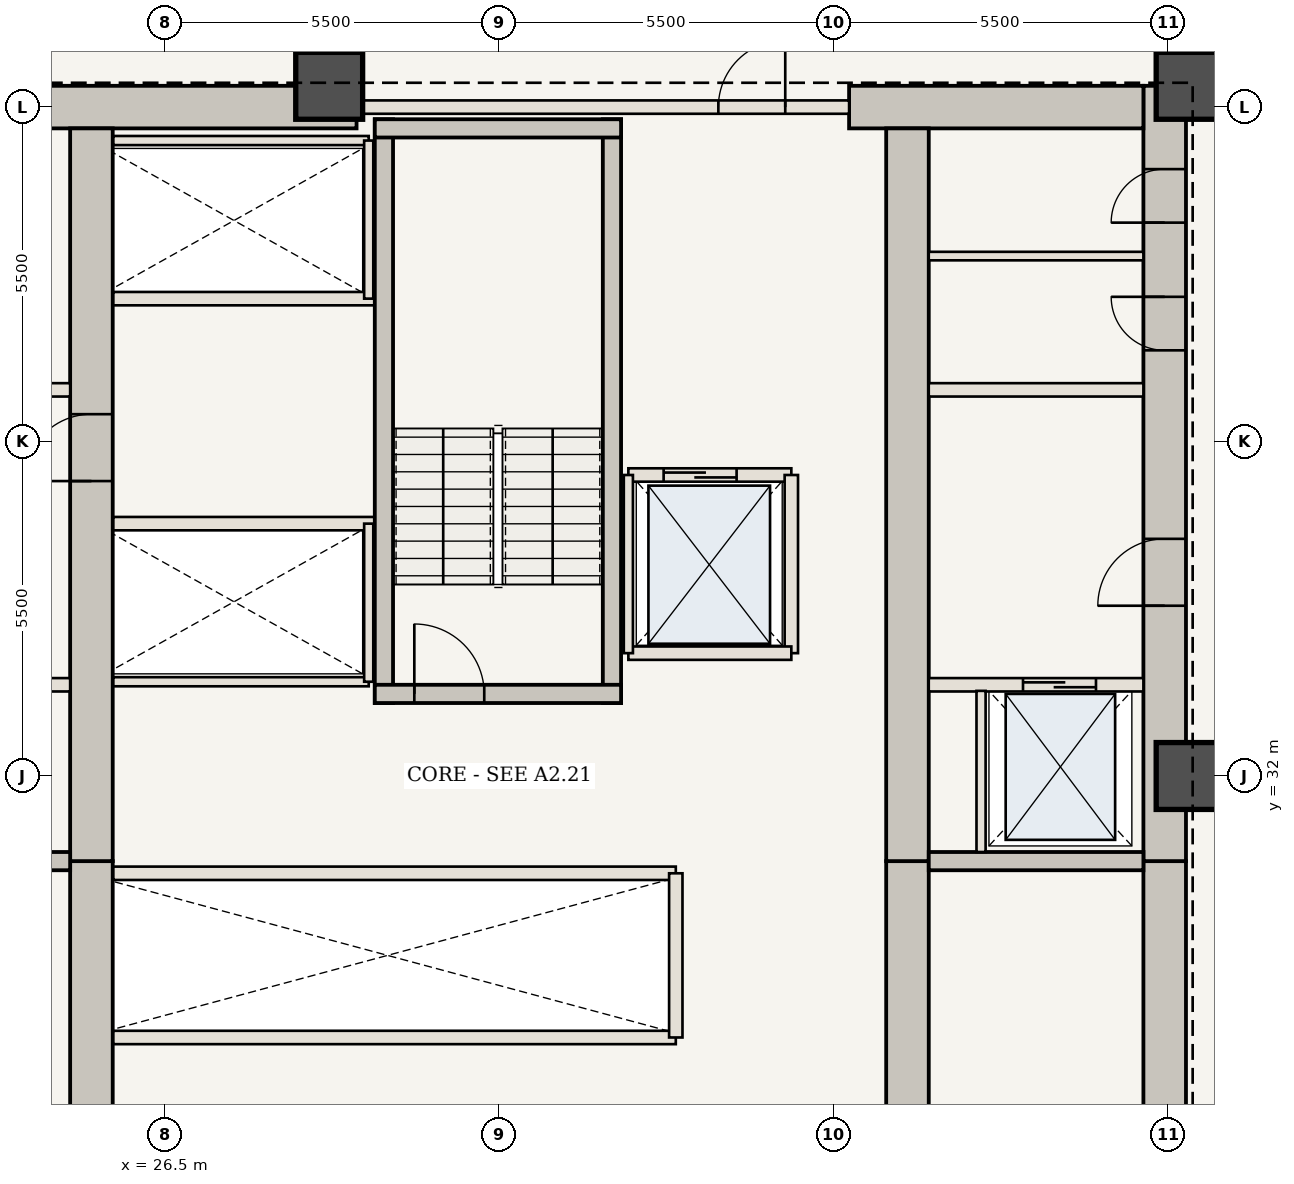
"""IFC4 building model, lengths in metres.
Left out: names, types, materials, properties, quantities, classifications, styles, units other than length and angle.
Written with IfcOpenShell. Run it as: python <this file> out.ifc"""

import sys

from ifc_helpers import new_model, si_unit, direction, frame, frame_2d, origin, origin_2d, place, context, subcontext, project, spatial, rectangle, extrude, element, fill, save


model = new_model("IFC4")
c1 = context("Model", 3, precision=1e-05, world=origin(), true_north=direction((0.0, 1.0)))
c2 = subcontext(c1, "Body", "Model", "MODEL_VIEW")
j1 = project(units=[si_unit("LENGTHUNIT", "METRE"), si_unit("PLANEANGLEUNIT", "RADIAN")], contexts=[c1])
p1 = place(None, origin())
s1 = spatial("IfcSite", under=j1, at=p1, CompositionType="ELEMENT")
p2 = place(p1, origin())
s2 = spatial("IfcBuilding", under=s1, at=p2, CompositionType="ELEMENT")
p3 = place(p2, frame((0.0, 0.0, 85.75)))
s3 = spatial("IfcBuildingStorey", under=s2, at=p3, CompositionType="ELEMENT", Elevation=85.75)
p4 = place(p3, frame((42.94, 20.6, 0.0), z_axis=(0.0, 0.0, 1.0), x_axis=(0.0, 1.0, 0.0)))
e1 = element("IfcWall", 1, at=p4, inside=s3, PredefinedType="SHEAR", context=c2, shape_type="SweptSolid", body=[
    extrude(rectangle(XDim=10.0, YDim=0.7, at=frame_2d((5.0, 0.0))), origin(), (0.0, 0.0, 1.0), 3.5),
])
p5 = place(p4, frame((1.15, 0.0, 0.0)))
e2 = element("IfcOpeningElement", 2, at=p5, cuts=e1, PredefinedType="OPENING", context=c2, shape_type="SweptSolid", body=[
    extrude(rectangle(XDim=1.15, YDim=2.15, at=frame_2d((0.575, 1.075))), frame((0.0, 0.36, 0.0), z_axis=(0.0, -1.0, 0.0), x_axis=(1.0, 0.0, 0.0)), (0.0, 0.0, 1.0), 0.72),
])
p6 = place(p3, frame((42.94, 30.6, 0.0), z_axis=(0.0, 0.0, 1.0), x_axis=(0.0, 1.0, 0.0)))
e3 = element("IfcWall", 3, at=p6, inside=s3, PredefinedType="SHEAR", context=c2, shape_type="SweptSolid", body=[
    extrude(rectangle(XDim=12.75, YDim=0.7, at=frame_2d((6.375, 0.0))), origin(), (0.0, 0.0, 1.0), 3.5),
])
p7 = place(p6, frame((4.2, 0.0, 0.0)))
e4 = element("IfcOpeningElement", 4, at=p7, cuts=e3, PredefinedType="OPENING", context=c2, shape_type="SweptSolid", body=[
    extrude(rectangle(XDim=1.1, YDim=2.15, at=frame_2d((0.55, 1.075))), frame((0.0, 0.36, 0.0), z_axis=(0.0, -1.0, 0.0), x_axis=(1.0, 0.0, 0.0)), (0.0, 0.0, 1.0), 0.72),
])
p8 = place(p6, frame((8.4, 0.0, 0.0)))
e5 = element("IfcOpeningElement", 5, at=p8, cuts=e3, PredefinedType="OPENING", context=c2, shape_type="SweptSolid", body=[
    extrude(rectangle(XDim=0.88, YDim=2.1, at=frame_2d((0.44, 1.05))), frame((0.0, 0.36, 0.0), z_axis=(0.0, -1.0, 0.0), x_axis=(1.0, 0.0, 0.0)), (0.0, 0.0, 1.0), 0.72),
])
p9 = place(p6, frame((10.5, 0.0, 0.0)))
e6 = element("IfcOpeningElement", 6, at=p9, cuts=e3, PredefinedType="OPENING", context=c2, shape_type="SweptSolid", body=[
    extrude(rectangle(XDim=0.88, YDim=2.1, at=frame_2d((0.44, 1.05))), frame((0.0, 0.36, 0.0), z_axis=(0.0, -1.0, 0.0), x_axis=(1.0, 0.0, 0.0)), (0.0, 0.0, 1.0), 0.72),
])
p10 = place(p3, frame((21.41, 43.0, 0.0), z_axis=(0.0, 0.0, 1.0), x_axis=(1.0, 0.0, 0.0)))
e7 = element("IfcWall", 7, at=p10, inside=s3, PredefinedType="SHEAR", context=c2, shape_type="SweptSolid", body=[
    extrude(rectangle(XDim=8.24, YDim=0.7, at=frame_2d((4.12, 0.0))), origin(), (0.0, 0.0, 1.0), 3.5),
])
p11 = place(p3, frame((37.75, 43.0, 0.0), z_axis=(0.0, 0.0, 1.0), x_axis=(1.0, 0.0, 0.0)))
e8 = element("IfcWall", 8, at=p11, inside=s3, PredefinedType="SHEAR", context=c2, shape_type="SweptSolid", body=[
    extrude(rectangle(XDim=4.84, YDim=0.7, at=frame_2d((2.42, 0.0))), origin(), (0.0, 0.0, 1.0), 3.5),
])
p12 = place(p3, frame((25.29, 21.3, 0.0), z_axis=(0.0, 0.0, 1.0), x_axis=(0.0, 1.0, 0.0)))
e9 = element("IfcWall", 9, at=p12, inside=s3, PredefinedType="SHEAR", context=c2, shape_type="SweptSolid", body=[
    extrude(rectangle(XDim=9.3, YDim=0.7, at=frame_2d((4.65, 0.0))), origin(), (0.0, 0.0, 1.0), 3.5),
])
p13 = place(p3, frame((25.29, 30.6, 0.0), z_axis=(0.0, 0.0, 1.0), x_axis=(0.0, 1.0, 0.0)))
e10 = element("IfcWall", 10, at=p13, inside=s3, PredefinedType="SHEAR", context=c2, shape_type="SweptSolid", body=[
    extrude(rectangle(XDim=12.05, YDim=0.7, at=frame_2d((6.025, 0.0))), origin(), (0.0, 0.0, 1.0), 3.5),
])
p14 = place(p13, frame((6.25, 0.0, 0.0)))
e11 = element("IfcOpeningElement", 11, at=p14, cuts=e10, PredefinedType="OPENING", context=c2, shape_type="SweptSolid", body=[
    extrude(rectangle(XDim=1.1, YDim=2.15, at=frame_2d((0.55, 1.075))), frame((0.0, 0.36, 0.0), z_axis=(0.0, -1.0, 0.0), x_axis=(1.0, 0.0, 0.0)), (0.0, 0.0, 1.0), 0.72),
])
p15 = place(p3, frame((38.71, 21.3, 0.0), z_axis=(0.0, 0.0, 1.0), x_axis=(0.0, 1.0, 0.0)))
e12 = element("IfcWall", 12, at=p15, inside=s3, PredefinedType="SHEAR", context=c2, shape_type="SweptSolid", body=[
    extrude(rectangle(XDim=9.3, YDim=0.7, at=frame_2d((4.65, 0.0))), origin(), (0.0, 0.0, 1.0), 3.5),
])
p16 = place(p3, frame((38.71, 30.6, 0.0), z_axis=(0.0, 0.0, 1.0), x_axis=(0.0, 1.0, 0.0)))
e13 = element("IfcWall", 13, at=p16, inside=s3, PredefinedType="SHEAR", context=c2, shape_type="SweptSolid", body=[
    extrude(rectangle(XDim=12.05, YDim=0.7, at=frame_2d((6.025, 0.0))), origin(), (0.0, 0.0, 1.0), 3.5),
])
for number, where, z_axis, x_axis in (
    (14, (43.35, 32.0, 0.0), (0.0, 0.0, 1.0), (1.0, 0.0, 0.0)),
    (15, (43.35, 43.35, 0.0), (0.0, 0.0, 1.0), (1.0, 0.0, 0.0)),
    (16, (29.2, 43.35, 0.0), (0.0, 0.0, 1.0), (1.0, 0.0, 0.0)),
):
    element("IfcColumn", number, at=place(p3, frame(where, z_axis=z_axis, x_axis=x_axis)), inside=s3, PredefinedType="COLUMN", context=c2, shape_type="SweptSolid", body=[
        extrude(rectangle(XDim=1.1, YDim=1.1, at=origin_2d()), origin(), (0.0, 0.0, 1.0), 3.5),
    ])
for number, where, z_axis, x_axis in (
    (17, (21.41, 30.6, 0.0), (0.0, 0.0, 1.0), (1.0, 0.0, 0.0)),
    (18, (39.06, 30.6, 0.0), (0.0, 0.0, 1.0), (1.0, 0.0, 0.0)),
):
    element("IfcWall", number, at=place(p3, frame(where, z_axis=z_axis, x_axis=x_axis)), inside=s3, PredefinedType="SHEAR", context=c2, shape_type="SweptSolid", body=[
        extrude(rectangle(XDim=3.53, YDim=0.3, at=frame_2d((1.765, 0.0))), origin(), (0.0, 0.0, 1.0), 3.32),
    ])
p17 = place(p3, frame((21.41, 33.5, 0.0), z_axis=(0.0, 0.0, 1.0), x_axis=(1.0, 0.0, 0.0)))
e19 = element("IfcWall", 19, at=p17, inside=s3, PredefinedType="STANDARD", context=c2, shape_type="SweptSolid", body=[
    extrude(rectangle(XDim=3.53, YDim=0.22, at=frame_2d((1.765, 0.0))), origin(), (0.0, 0.0, 1.0), 3.32),
])
p18 = place(p17, frame((0.75, 0.0, 0.0)))
e20 = element("IfcOpeningElement", 20, at=p18, cuts=e19, PredefinedType="OPENING", context=c2, shape_type="SweptSolid", body=[
    extrude(rectangle(XDim=1.2, YDim=2.2, at=frame_2d((0.6, 1.1))), frame((0.0, 0.12, 0.0), z_axis=(0.0, -1.0, 0.0), x_axis=(1.0, 0.0, 0.0)), (0.0, 0.0, 1.0), 0.24),
])
p19 = place(p3, frame((39.06, 33.5, 0.0), z_axis=(0.0, 0.0, 1.0), x_axis=(1.0, 0.0, 0.0)))
e21 = element("IfcWall", 21, at=p19, inside=s3, PredefinedType="STANDARD", context=c2, shape_type="SweptSolid", body=[
    extrude(rectangle(XDim=3.53, YDim=0.22, at=frame_2d((1.765, 0.0))), origin(), (0.0, 0.0, 1.0), 3.32),
])
p20 = place(p19, frame((1.55, 0.0, 0.0)))
e22 = element("IfcOpeningElement", 22, at=p20, cuts=e21, PredefinedType="OPENING", context=c2, shape_type="SweptSolid", body=[
    extrude(rectangle(XDim=1.2, YDim=2.2, at=frame_2d((0.6, 1.1))), frame((0.0, 0.12, 0.0), z_axis=(0.0, -1.0, 0.0), x_axis=(1.0, 0.0, 0.0)), (0.0, 0.0, 1.0), 0.24),
])
p21 = place(p3, frame((39.92, 30.75, 0.0), z_axis=(0.0, 0.0, 1.0), x_axis=(0.0, 1.0, 0.0)))
e23 = element("IfcWall", 23, at=p21, inside=s3, PredefinedType="STANDARD", context=c2, shape_type="SweptSolid", body=[
    extrude(rectangle(XDim=2.65, YDim=0.15, at=frame_2d((1.325, 0.0))), origin(), (0.0, 0.0, 1.0), 3.32),
])
for number, where, z_axis, x_axis in (
    (24, (21.41, 38.35, 0.0), (0.0, 0.0, 1.0), (1.0, 0.0, 0.0)),
    (25, (39.06, 38.35, 0.0), (0.0, 0.0, 1.0), (1.0, 0.0, 0.0)),
):
    element("IfcWall", number, at=place(p3, frame(where, z_axis=z_axis, x_axis=x_axis)), inside=s3, PredefinedType="STANDARD", context=c2, shape_type="SweptSolid", body=[
        extrude(rectangle(XDim=3.53, YDim=0.22, at=frame_2d((1.765, 0.0))), origin(), (0.0, 0.0, 1.0), 3.32),
    ])
p22 = place(p3, frame((39.06, 40.55, 0.0), z_axis=(0.0, 0.0, 1.0), x_axis=(1.0, 0.0, 0.0)))
e26 = element("IfcWall", 26, at=p22, inside=s3, PredefinedType="STANDARD", context=c2, shape_type="SweptSolid", body=[
    extrude(rectangle(XDim=3.53, YDim=0.14, at=frame_2d((1.765, 0.0))), origin(), (0.0, 0.0, 1.0), 3.32),
])
for number, where, z_axis, x_axis in (
    (27, (25.65, 27.7, 0.0), (0.0, 0.0, 1.0), (1.0, 0.0, 0.0)),
    (28, (25.65, 30.4, 0.0), (0.0, 0.0, 1.0), (1.0, 0.0, 0.0)),
):
    element("IfcWall", number, at=place(p3, frame(where, z_axis=z_axis, x_axis=x_axis)), inside=s3, PredefinedType="STANDARD", context=c2, shape_type="SweptSolid", body=[
        extrude(rectangle(XDim=9.25, YDim=0.22, at=frame_2d((4.625, 0.0))), origin(), (0.0, 0.0, 1.0), 3.32),
    ])
p23 = place(p3, frame((34.9, 27.7, 0.0), z_axis=(0.0, 0.0, 1.0), x_axis=(0.0, 1.0, 0.0)))
e29 = element("IfcWall", 29, at=p23, inside=s3, PredefinedType="STANDARD", context=c2, shape_type="SweptSolid", body=[
    extrude(rectangle(XDim=2.7, YDim=0.22, at=frame_2d((1.35, 0.0))), origin(), (0.0, 0.0, 1.0), 3.32),
])
p24 = place(p3, frame((25.65, 36.15, 0.0), z_axis=(0.0, 0.0, 1.0), x_axis=(1.0, 0.0, 0.0)))
e30 = element("IfcWall", 30, at=p24, inside=s3, PredefinedType="STANDARD", context=c2, shape_type="SweptSolid", body=[
    extrude(rectangle(XDim=4.3, YDim=0.22, at=frame_2d((2.15, 0.0))), origin(), (0.0, 0.0, 1.0), 3.32),
])
p25 = place(p3, frame((25.65, 33.55, 0.0), z_axis=(0.0, 0.0, 1.0), x_axis=(1.0, 0.0, 0.0)))
e31 = element("IfcWall", 31, at=p25, inside=s3, PredefinedType="STANDARD", context=c2, shape_type="SweptSolid", body=[
    extrude(rectangle(XDim=4.2, YDim=0.15, at=frame_2d((2.1, 0.0))), origin(), (0.0, 0.0, 1.0), 3.32),
])
p26 = place(p3, frame((29.85, 33.55, 0.0), z_axis=(0.0, 0.0, 1.0), x_axis=(0.0, 1.0, 0.0)))
e32 = element("IfcWall", 32, at=p26, inside=s3, PredefinedType="STANDARD", context=c2, shape_type="SweptSolid", body=[
    extrude(rectangle(XDim=2.6, YDim=0.15, at=frame_2d((1.3, 0.0))), origin(), (0.0, 0.0, 1.0), 3.32),
])
p27 = place(p3, frame((25.65, 39.85, 0.0), z_axis=(0.0, 0.0, 1.0), x_axis=(1.0, 0.0, 0.0)))
e33 = element("IfcWall", 33, at=p27, inside=s3, PredefinedType="STANDARD", context=c2, shape_type="SweptSolid", body=[
    extrude(rectangle(XDim=4.3, YDim=0.22, at=frame_2d((2.15, 0.0))), origin(), (0.0, 0.0, 1.0), 3.32),
])
p28 = place(p3, frame((25.65, 42.45, 0.0), z_axis=(0.0, 0.0, 1.0), x_axis=(1.0, 0.0, 0.0)))
e34 = element("IfcWall", 34, at=p28, inside=s3, PredefinedType="STANDARD", context=c2, shape_type="SweptSolid", body=[
    extrude(rectangle(XDim=4.2, YDim=0.15, at=frame_2d((2.1, 0.0))), origin(), (0.0, 0.0, 1.0), 3.32),
])
p29 = place(p3, frame((29.85, 39.85, 0.0), z_axis=(0.0, 0.0, 1.0), x_axis=(0.0, 1.0, 0.0)))
e35 = element("IfcWall", 35, at=p29, inside=s3, PredefinedType="STANDARD", context=c2, shape_type="SweptSolid", body=[
    extrude(rectangle(XDim=2.6, YDim=0.15, at=frame_2d((1.3, 0.0))), origin(), (0.0, 0.0, 1.0), 3.32),
])
for number, where, z_axis, x_axis in (
    (36, (30.1, 33.2, 0.0), (0.0, 0.0, 1.0), (0.0, 1.0, 0.0)),
    (37, (33.85, 33.2, 0.0), (0.0, 0.0, 1.0), (0.0, 1.0, 0.0)),
):
    element("IfcWall", number, at=place(p3, frame(where, z_axis=z_axis, x_axis=x_axis)), inside=s3, PredefinedType="SHEAR", context=c2, shape_type="SweptSolid", body=[
        extrude(rectangle(XDim=9.6, YDim=0.3, at=frame_2d((4.8, 0.0))), origin(), (0.0, 0.0, 1.0), 3.32),
    ])
p30 = place(p3, frame((29.95, 33.35, 0.0), z_axis=(0.0, 0.0, 1.0), x_axis=(1.0, 0.0, 0.0)))
e38 = element("IfcWall", 38, at=p30, inside=s3, PredefinedType="SHEAR", context=c2, shape_type="SweptSolid", body=[
    extrude(rectangle(XDim=4.05, YDim=0.3, at=frame_2d((2.025, 0.0))), origin(), (0.0, 0.0, 1.0), 3.32),
])
p31 = place(p30, frame((0.65, 0.0, 0.0)))
e39 = element("IfcOpeningElement", 39, at=p31, cuts=e38, PredefinedType="OPENING", context=c2, shape_type="SweptSolid", body=[
    extrude(rectangle(XDim=1.15, YDim=2.15, at=frame_2d((0.575, 1.075))), frame((0.0, 0.16, 0.0), z_axis=(0.0, -1.0, 0.0), x_axis=(1.0, 0.0, 0.0)), (0.0, 0.0, 1.0), 0.32),
])
p32 = place(p3, frame((29.95, 42.65, 0.0), z_axis=(0.0, 0.0, 1.0), x_axis=(1.0, 0.0, 0.0)))
e40 = element("IfcWall", 40, at=p32, inside=s3, PredefinedType="SHEAR", context=c2, shape_type="SweptSolid", body=[
    extrude(rectangle(XDim=4.05, YDim=0.3, at=frame_2d((2.025, 0.0))), origin(), (0.0, 0.0, 1.0), 3.32),
])
p33 = place(p3, frame((29.65, 43.0, 0.0), z_axis=(0.0, 0.0, 1.0), x_axis=(1.0, 0.0, 0.0)))
e41 = element("IfcWall", 41, at=p33, inside=s3, PredefinedType="STANDARD", context=c2, shape_type="SweptSolid", body=[
    extrude(rectangle(XDim=8.1, YDim=0.22, at=frame_2d((4.05, 0.0))), origin(), (0.0, 0.0, 1.0), 3.32),
])
p34 = place(p33, frame((5.95, 0.0, 0.0)))
e42 = element("IfcOpeningElement", 42, at=p34, cuts=e41, PredefinedType="OPENING", context=c2, shape_type="SweptSolid", body=[
    extrude(rectangle(XDim=1.1, YDim=2.15, at=frame_2d((0.55, 1.075))), frame((0.0, 0.12, 0.0), z_axis=(0.0, -1.0, 0.0), x_axis=(1.0, 0.0, 0.0)), (0.0, 0.0, 1.0), 0.24),
])
p35 = place(p3, frame((34.12, 36.95, 0.0), z_axis=(0.0, 0.0, 1.0), x_axis=(1.0, 0.0, 0.0)))
e43 = element("IfcWall", 43, at=p35, inside=s3, PredefinedType="STANDARD", context=c2, shape_type="SweptSolid", body=[
    extrude(rectangle(XDim=2.68, YDim=0.22, at=frame_2d((1.34, 0.0))), origin(), (0.0, 0.0, 1.0), 3.32),
])
p36 = place(p35, frame((0.58, 0.0, 0.0)))
e44 = element("IfcOpeningElement", 44, at=p36, cuts=e43, PredefinedType="OPENING", context=c2, shape_type="SweptSolid", body=[
    extrude(rectangle(XDim=1.2, YDim=2.2, at=frame_2d((0.6, 1.1))), frame((0.0, 0.12, 0.0), z_axis=(0.0, -1.0, 0.0), x_axis=(1.0, 0.0, 0.0)), (0.0, 0.0, 1.0), 0.24),
])
p37 = place(p3, frame((36.8, 34.02, 0.0), z_axis=(0.0, 0.0, 1.0), x_axis=(0.0, 1.0, 0.0)))
e45 = element("IfcWall", 45, at=p37, inside=s3, PredefinedType="STANDARD", context=c2, shape_type="SweptSolid", body=[
    extrude(rectangle(XDim=2.93, YDim=0.22, at=frame_2d((1.465, 0.0))), origin(), (0.0, 0.0, 1.0), 3.32),
])
p38 = place(p3, frame((34.12, 34.02, 0.0), z_axis=(0.0, 0.0, 1.0), x_axis=(1.0, 0.0, 0.0)))
e46 = element("IfcWall", 46, at=p38, inside=s3, PredefinedType="STANDARD", context=c2, shape_type="SweptSolid", body=[
    extrude(rectangle(XDim=2.68, YDim=0.22, at=frame_2d((1.34, 0.0))), origin(), (0.0, 0.0, 1.0), 3.32),
])
p39 = place(p3, frame((34.12, 34.02, 0.0), z_axis=(0.0, 0.0, 1.0), x_axis=(0.0, 1.0, 0.0)))
e47 = element("IfcWall", 47, at=p39, inside=s3, PredefinedType="STANDARD", context=c2, shape_type="SweptSolid", body=[
    extrude(rectangle(XDim=2.93, YDim=0.15, at=frame_2d((1.465, 0.0))), origin(), (0.0, 0.0, 1.0), 3.32),
])
p40 = place(p7, origin())
e48 = element("IfcDoor", 48, at=p40, inside=s3, OperationType="SINGLE_SWING_LEFT", PredefinedType="DOOR", context=c2, shape_type="SweptSolid", body=[
    extrude(rectangle(XDim=1.1, YDim=2.15, at=frame_2d((0.55, 1.075))), frame((0.0, 0.025, 0.0), z_axis=(0.0, -1.0, 0.0), x_axis=(1.0, 0.0, 0.0)), (0.0, 0.0, 1.0), 0.05),
])
fill(e4, e48)
p41 = place(p14, origin())
e49 = element("IfcDoor", 49, at=p41, inside=s3, OperationType="SINGLE_SWING_LEFT", PredefinedType="DOOR", context=c2, shape_type="SweptSolid", body=[
    extrude(rectangle(XDim=1.1, YDim=2.15, at=frame_2d((0.55, 1.075))), frame((0.0, 0.025, 0.0), z_axis=(0.0, -1.0, 0.0), x_axis=(1.0, 0.0, 0.0)), (0.0, 0.0, 1.0), 0.05),
])
fill(e11, e49)
p42 = place(p8, origin())
e50 = element("IfcDoor", 50, at=p42, inside=s3, OperationType="SINGLE_SWING_RIGHT", PredefinedType="DOOR", context=c2, shape_type="SweptSolid", body=[
    extrude(rectangle(XDim=0.88, YDim=2.1, at=frame_2d((0.44, 1.05))), frame((0.0, 0.025, 0.0), z_axis=(0.0, -1.0, 0.0), x_axis=(1.0, 0.0, 0.0)), (0.0, 0.0, 1.0), 0.05),
])
fill(e5, e50)
p43 = place(p9, origin())
e51 = element("IfcDoor", 51, at=p43, inside=s3, OperationType="SINGLE_SWING_LEFT", PredefinedType="DOOR", context=c2, shape_type="SweptSolid", body=[
    extrude(rectangle(XDim=0.88, YDim=2.1, at=frame_2d((0.44, 1.05))), frame((0.0, 0.025, 0.0), z_axis=(0.0, -1.0, 0.0), x_axis=(1.0, 0.0, 0.0)), (0.0, 0.0, 1.0), 0.05),
])
fill(e6, e51)
p44 = place(p20, origin())
e52 = element("IfcDoor", 52, at=p44, inside=s3, OperationType="DOUBLE_DOOR_SLIDING", PredefinedType="DOOR", context=c2, shape_type="SweptSolid", body=[
    extrude(rectangle(XDim=1.2, YDim=2.2, at=frame_2d((0.6, 1.1))), frame((0.0, 0.025, 0.0), z_axis=(0.0, -1.0, 0.0), x_axis=(1.0, 0.0, 0.0)), (0.0, 0.0, 1.0), 0.05),
])
fill(e22, e52)
p45 = place(p31, origin())
e53 = element("IfcDoor", 53, at=p45, inside=s3, OperationType="SINGLE_SWING_LEFT", PredefinedType="DOOR", context=c2, shape_type="SweptSolid", body=[
    extrude(rectangle(XDim=1.15, YDim=2.15, at=frame_2d((0.575, 1.075))), frame((0.0, 0.025, 0.0), z_axis=(0.0, -1.0, 0.0), x_axis=(1.0, 0.0, 0.0)), (0.0, 0.0, 1.0), 0.05),
])
fill(e39, e53)
p46 = place(p34, origin())
e54 = element("IfcDoor", 54, at=p46, inside=s3, OperationType="SINGLE_SWING_RIGHT", PredefinedType="DOOR", context=c2, shape_type="SweptSolid", body=[
    extrude(rectangle(XDim=1.1, YDim=2.15, at=frame_2d((0.55, 1.075))), frame((0.0, 0.025, 0.0), z_axis=(0.0, -1.0, 0.0), x_axis=(1.0, 0.0, 0.0)), (0.0, 0.0, 1.0), 0.05),
])
fill(e42, e54)
p47 = place(p36, origin())
e55 = element("IfcDoor", 55, at=p47, inside=s3, OperationType="DOUBLE_DOOR_SLIDING", PredefinedType="DOOR", context=c2, shape_type="SweptSolid", body=[
    extrude(rectangle(XDim=1.2, YDim=2.2, at=frame_2d((0.6, 1.1))), frame((0.0, 0.025, 0.0), z_axis=(0.0, -1.0, 0.0), x_axis=(1.0, 0.0, 0.0)), (0.0, 0.0, 1.0), 0.05),
])
fill(e44, e55)
save(model, sys.argv[1])
